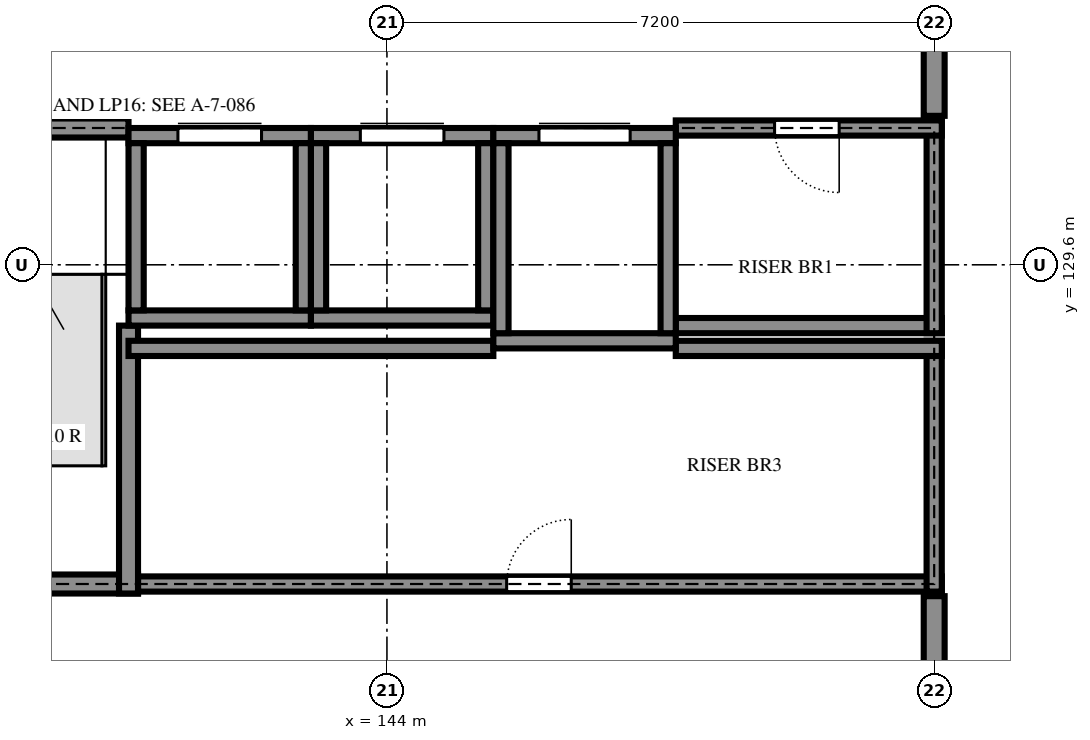
"""IFC4 building model, lengths in metres.
Left out: names, types, materials, properties, quantities, classifications, styles, units other than length and angle.
Written with IfcOpenShell. Run it as: python <this file> out.ifc"""

import sys

from ifc_helpers import new_model, si_unit, direction, frame, frame_2d, origin, place, context, subcontext, project, spatial, rectangle, extrude, element, fill, save


model = new_model("IFC4")
c1 = context("Model", 3, precision=1e-05, world=origin(), true_north=direction((0.0, 1.0)))
c2 = subcontext(c1, "Body", "Model", "MODEL_VIEW")
j1 = project(units=[si_unit("LENGTHUNIT", "METRE"), si_unit("PLANEANGLEUNIT", "RADIAN")], contexts=[c1])
p1 = place(None, origin())
s1 = spatial("IfcSite", under=j1, at=p1, CompositionType="ELEMENT")
p2 = place(p1, origin())
s2 = spatial("IfcBuilding", under=s1, at=p2, CompositionType="ELEMENT")
p3 = place(p2, frame((0.0, 0.0, 10.8)))
s3 = spatial("IfcBuildingStorey", under=s2, at=p3, CompositionType="ELEMENT", Elevation=10.8)
p4 = place(p3, frame((136.675, 125.4, 0.0), z_axis=(0.0, 0.0, 1.0), x_axis=(1.0, 0.0, 0.0)))
e1 = element("IfcWall", 1, at=p4, inside=s3, PredefinedType="SHEAR", context=c2, shape_type="SweptSolid", body=[
    extrude(rectangle(XDim=4.05, YDim=0.25, at=frame_2d((2.025, 0.0))), origin(), (0.0, 0.0, 1.0), 3.6),
])
p5 = place(p4, frame((1.375, 0.0, 0.0)))
e2 = element("IfcOpeningElement", 2, at=p5, cuts=e1, PredefinedType="OPENING", context=c2, shape_type="SweptSolid", body=[
    extrude(rectangle(XDim=1.2, YDim=2.4, at=frame_2d((0.6, 1.2))), frame((0.0, 0.135, 0.0), z_axis=(0.0, -1.0, 0.0), x_axis=(1.0, 0.0, 0.0)), (0.0, 0.0, 1.0), 0.27),
])
p6 = place(p3, frame((140.725, 125.4, 0.0), z_axis=(0.0, 0.0, 1.0), x_axis=(1.0, 0.0, 0.0)))
e3 = element("IfcWall", 3, at=p6, inside=s3, PredefinedType="SHEAR", context=c2, shape_type="SweptSolid", body=[
    extrude(rectangle(XDim=10.575, YDim=0.2, at=frame_2d((5.288, 0.0))), origin(), (0.0, 0.0, 1.0), 3.6),
])
p7 = place(p6, frame((4.85, 0.0, 0.0)))
e4 = element("IfcOpeningElement", 4, at=p7, cuts=e3, PredefinedType="OPENING", context=c2, shape_type="SweptSolid", body=[
    extrude(rectangle(XDim=0.85, YDim=2.1, at=frame_2d((0.425, 1.05))), frame((0.0, 0.11, 0.0), z_axis=(0.0, -1.0, 0.0), x_axis=(1.0, 0.0, 0.0)), (0.0, 0.0, 1.0), 0.22),
])
p8 = place(p3, frame((140.6, 125.275, 0.0), z_axis=(0.0, 0.0, 1.0), x_axis=(0.0, 1.0, 0.0)))
e5 = element("IfcWall", 5, at=p8, inside=s3, PredefinedType="SHEAR", context=c2, shape_type="SweptSolid", body=[
    extrude(rectangle(XDim=3.525, YDim=0.25, at=frame_2d((1.763, 0.0))), origin(), (0.0, 0.0, 1.0), 3.6),
])
p9 = place(p3, frame((151.2, 125.3, 0.0), z_axis=(0.0, 0.0, 1.0), x_axis=(0.0, 1.0, 0.0)))
e6 = element("IfcWall", 6, at=p9, inside=s3, PredefinedType="SHEAR", context=c2, shape_type="SweptSolid", body=[
    extrude(rectangle(XDim=3.3, YDim=0.2, at=frame_2d((1.65, 0.0))), origin(), (0.0, 0.0, 1.0), 3.6),
])
p10 = place(p3, frame((140.6, 128.5, 0.0), z_axis=(0.0, 0.0, 1.0), x_axis=(1.0, 0.0, 0.0)))
e7 = element("IfcWall", 7, at=p10, inside=s3, PredefinedType="SHEAR", context=c2, shape_type="SweptSolid", body=[
    extrude(rectangle(XDim=4.8, YDim=0.2, at=frame_2d((2.4, 0.0))), origin(), (0.0, 0.0, 1.0), 3.6),
])
for number, where, z_axis, x_axis in (
    (8, (147.8, 128.5, 0.0), (0.0, 0.0, 1.0), (1.0, 0.0, 0.0)),
    (9, (147.8, 128.8, 0.0), (0.0, 0.0, 1.0), (1.0, 0.0, 0.0)),
):
    element("IfcWall", number, at=place(p3, frame(where, z_axis=z_axis, x_axis=x_axis)), inside=s3, PredefinedType="SHEAR", context=c2, shape_type="SweptSolid", body=[
        extrude(rectangle(XDim=3.5, YDim=0.2, at=frame_2d((1.75, 0.0))), origin(), (0.0, 0.0, 1.0), 3.6),
    ])
p11 = place(p3, frame((151.2, 128.7, 0.0), z_axis=(0.0, 0.0, 1.0), x_axis=(0.0, 1.0, 0.0)))
e10 = element("IfcWall", 10, at=p11, inside=s3, PredefinedType="SHEAR", context=c2, shape_type="SweptSolid", body=[
    extrude(rectangle(XDim=2.8, YDim=0.2, at=frame_2d((1.4, 0.0))), origin(), (0.0, 0.0, 1.0), 3.6),
])
p12 = place(p3, frame((140.6, 131.4, 0.0), z_axis=(0.0, 0.0, 1.0), x_axis=(-1.0, 0.0, 0.0)))
e11 = element("IfcWall", 11, at=p12, inside=s3, PredefinedType="SHEAR", context=c2, shape_type="SweptSolid", body=[
    extrude(rectangle(XDim=3.925, YDim=0.25, at=frame_2d((1.962, 0.0))), origin(), (0.0, 0.0, 1.0), 3.6),
])
p13 = place(p3, frame((151.3, 131.4, 0.0), z_axis=(0.0, 0.0, 1.0), x_axis=(-1.0, 0.0, 0.0)))
e12 = element("IfcWall", 12, at=p13, inside=s3, PredefinedType="SHEAR", context=c2, shape_type="SweptSolid", body=[
    extrude(rectangle(XDim=3.5, YDim=0.2, at=frame_2d((1.75, 0.0))), origin(), (0.0, 0.0, 1.0), 3.6),
])
p14 = place(p13, frame((1.35, 0.0, 0.0)))
e13 = element("IfcOpeningElement", 13, at=p14, cuts=e12, PredefinedType="OPENING", context=c2, shape_type="SweptSolid", body=[
    extrude(rectangle(XDim=0.85, YDim=2.1, at=frame_2d((0.425, 1.05))), frame((0.0, 0.11, 0.0), z_axis=(0.0, -1.0, 0.0), x_axis=(1.0, 0.0, 0.0)), (0.0, 0.0, 1.0), 0.22),
])
p15 = place(p3, frame((140.6, 128.9, 0.0), z_axis=(0.0, 0.0, 1.0), x_axis=(1.0, 0.0, 0.0)))
e14 = element("IfcWall", 14, at=p15, inside=s3, PredefinedType="SHEAR", context=c2, shape_type="SweptSolid", body=[
    extrude(rectangle(XDim=2.4, YDim=0.2, at=frame_2d((1.2, 0.0))), origin(), (0.0, 0.0, 1.0), 3.6),
])
p16 = place(p3, frame((140.6, 131.3, 0.0), z_axis=(0.0, 0.0, 1.0), x_axis=(1.0, 0.0, 0.0)))
e15 = element("IfcWall", 15, at=p16, inside=s3, PredefinedType="SHEAR", context=c2, shape_type="SweptSolid", body=[
    extrude(rectangle(XDim=2.4, YDim=0.2, at=frame_2d((1.2, 0.0))), origin(), (0.0, 0.0, 1.0), 3.6),
])
p17 = place(p16, frame((0.65, 0.0, 0.0)))
e16 = element("IfcOpeningElement", 16, at=p17, cuts=e15, PredefinedType="OPENING", context=c2, shape_type="SweptSolid", body=[
    extrude(rectangle(XDim=1.1, YDim=2.1, at=frame_2d((0.55, 1.05))), frame((0.0, 0.11, 0.0), z_axis=(0.0, -1.0, 0.0), x_axis=(1.0, 0.0, 0.0)), (0.0, 0.0, 1.0), 0.22),
])
for number, where, z_axis, x_axis in (
    (17, (140.7, 129.0, 0.0), (0.0, 0.0, 1.0), (0.0, 1.0, 0.0)),
    (18, (142.9, 129.0, 0.0), (0.0, 0.0, 1.0), (0.0, 1.0, 0.0)),
):
    element("IfcWall", number, at=place(p3, frame(where, z_axis=z_axis, x_axis=x_axis)), inside=s3, PredefinedType="SHEAR", context=c2, shape_type="SweptSolid", body=[
        extrude(rectangle(XDim=2.2, YDim=0.2, at=frame_2d((1.1, 0.0))), origin(), (0.0, 0.0, 1.0), 3.6),
    ])
p18 = place(p3, frame((143.0, 128.9, 0.0), z_axis=(0.0, 0.0, 1.0), x_axis=(1.0, 0.0, 0.0)))
e19 = element("IfcWall", 19, at=p18, inside=s3, PredefinedType="SHEAR", context=c2, shape_type="SweptSolid", body=[
    extrude(rectangle(XDim=2.4, YDim=0.2, at=frame_2d((1.2, 0.0))), origin(), (0.0, 0.0, 1.0), 3.6),
])
p19 = place(p3, frame((143.0, 131.3, 0.0), z_axis=(0.0, 0.0, 1.0), x_axis=(1.0, 0.0, 0.0)))
e20 = element("IfcWall", 20, at=p19, inside=s3, PredefinedType="SHEAR", context=c2, shape_type="SweptSolid", body=[
    extrude(rectangle(XDim=2.4, YDim=0.2, at=frame_2d((1.2, 0.0))), origin(), (0.0, 0.0, 1.0), 3.6),
])
p20 = place(p19, frame((0.65, 0.0, 0.0)))
e21 = element("IfcOpeningElement", 21, at=p20, cuts=e20, PredefinedType="OPENING", context=c2, shape_type="SweptSolid", body=[
    extrude(rectangle(XDim=1.1, YDim=2.1, at=frame_2d((0.55, 1.05))), frame((0.0, 0.11, 0.0), z_axis=(0.0, -1.0, 0.0), x_axis=(1.0, 0.0, 0.0)), (0.0, 0.0, 1.0), 0.22),
])
for number, where, z_axis, x_axis in (
    (22, (143.1, 129.0, 0.0), (0.0, 0.0, 1.0), (0.0, 1.0, 0.0)),
    (23, (145.3, 129.0, 0.0), (0.0, 0.0, 1.0), (0.0, 1.0, 0.0)),
):
    element("IfcWall", number, at=place(p3, frame(where, z_axis=z_axis, x_axis=x_axis)), inside=s3, PredefinedType="SHEAR", context=c2, shape_type="SweptSolid", body=[
        extrude(rectangle(XDim=2.2, YDim=0.2, at=frame_2d((1.1, 0.0))), origin(), (0.0, 0.0, 1.0), 3.6),
    ])
p21 = place(p3, frame((145.4, 128.6, 0.0), z_axis=(0.0, 0.0, 1.0), x_axis=(1.0, 0.0, 0.0)))
e24 = element("IfcWall", 24, at=p21, inside=s3, PredefinedType="SHEAR", context=c2, shape_type="SweptSolid", body=[
    extrude(rectangle(XDim=2.4, YDim=0.2, at=frame_2d((1.2, 0.0))), origin(), (0.0, 0.0, 1.0), 3.6),
])
p22 = place(p3, frame((145.4, 131.3, 0.0), z_axis=(0.0, 0.0, 1.0), x_axis=(1.0, 0.0, 0.0)))
e25 = element("IfcWall", 25, at=p22, inside=s3, PredefinedType="SHEAR", context=c2, shape_type="SweptSolid", body=[
    extrude(rectangle(XDim=2.4, YDim=0.2, at=frame_2d((1.2, 0.0))), origin(), (0.0, 0.0, 1.0), 3.6),
])
p23 = place(p22, frame((0.6, 0.0, 0.0)))
e26 = element("IfcOpeningElement", 26, at=p23, cuts=e25, PredefinedType="OPENING", context=c2, shape_type="SweptSolid", body=[
    extrude(rectangle(XDim=1.2, YDim=2.1, at=frame_2d((0.6, 1.05))), frame((0.0, 0.11, 0.0), z_axis=(0.0, -1.0, 0.0), x_axis=(1.0, 0.0, 0.0)), (0.0, 0.0, 1.0), 0.22),
])
for number, where, z_axis, x_axis in (
    (27, (145.5, 128.7, 0.0), (0.0, 0.0, 1.0), (0.0, 1.0, 0.0)),
    (28, (147.7, 128.7, 0.0), (0.0, 0.0, 1.0), (0.0, 1.0, 0.0)),
):
    element("IfcWall", number, at=place(p3, frame(where, z_axis=z_axis, x_axis=x_axis)), inside=s3, PredefinedType="SHEAR", context=c2, shape_type="SweptSolid", body=[
        extrude(rectangle(XDim=2.5, YDim=0.2, at=frame_2d((1.25, 0.0))), origin(), (0.0, 0.0, 1.0), 3.6),
    ])
p24 = place(p3, frame((151.2, 122.64, 0.0), z_axis=(0.0, 0.0, 1.0), x_axis=(0.0, 1.0, 0.0)))
e29 = element("IfcWall", 29, at=p24, inside=s3, PredefinedType="PARTITIONING", context=c2, shape_type="SweptSolid", body=[
    extrude(rectangle(XDim=2.6, YDim=0.275, at=frame_2d((1.3, 0.0))), origin(), (0.0, 0.0, 1.0), 3.6),
])
p25 = place(p3, frame((151.2, 134.333, 0.0), z_axis=(0.0, 0.0, 1.0), x_axis=(0.0, -1.0, 0.0)))
e30 = element("IfcWall", 30, at=p25, inside=s3, PredefinedType="PARTITIONING", context=c2, shape_type="SweptSolid", body=[
    extrude(rectangle(XDim=2.772, YDim=0.275, at=frame_2d((1.386, 0.0))), origin(), (0.0, 0.0, 1.0), 3.6),
])
p26 = place(p17, origin())
e31 = element("IfcDoor", 31, at=p26, inside=s3, OperationType="SLIDING_TO_LEFT", PredefinedType="DOOR", context=c2, shape_type="SweptSolid", body=[
    extrude(rectangle(XDim=1.1, YDim=2.1, at=frame_2d((0.55, 1.05))), frame((0.0, 0.025, 0.0), z_axis=(0.0, -1.0, 0.0), x_axis=(1.0, 0.0, 0.0)), (0.0, 0.0, 1.0), 0.05),
])
fill(e16, e31)
p27 = place(p20, origin())
e32 = element("IfcDoor", 32, at=p27, inside=s3, OperationType="SLIDING_TO_LEFT", PredefinedType="DOOR", context=c2, shape_type="SweptSolid", body=[
    extrude(rectangle(XDim=1.1, YDim=2.1, at=frame_2d((0.55, 1.05))), frame((0.0, 0.025, 0.0), z_axis=(0.0, -1.0, 0.0), x_axis=(1.0, 0.0, 0.0)), (0.0, 0.0, 1.0), 0.05),
])
fill(e21, e32)
p28 = place(p23, origin())
e33 = element("IfcDoor", 33, at=p28, inside=s3, OperationType="SLIDING_TO_LEFT", PredefinedType="DOOR", context=c2, shape_type="SweptSolid", body=[
    extrude(rectangle(XDim=1.2, YDim=2.1, at=frame_2d((0.6, 1.05))), frame((0.0, 0.025, 0.0), z_axis=(0.0, -1.0, 0.0), x_axis=(1.0, 0.0, 0.0)), (0.0, 0.0, 1.0), 0.05),
])
fill(e26, e33)
p29 = place(p14, origin())
e34 = element("IfcDoor", 34, at=p29, inside=s3, OperationType="SINGLE_SWING_RIGHT", PredefinedType="DOOR", context=c2, shape_type="SweptSolid", body=[
    extrude(rectangle(XDim=0.85, YDim=2.1, at=frame_2d((0.425, 1.05))), frame((0.0, 0.025, 0.0), z_axis=(0.0, -1.0, 0.0), x_axis=(1.0, 0.0, 0.0)), (0.0, 0.0, 1.0), 0.05),
])
fill(e13, e34)
p30 = place(p7, origin())
e35 = element("IfcDoor", 35, at=p30, inside=s3, OperationType="SINGLE_SWING_LEFT", PredefinedType="DOOR", context=c2, shape_type="SweptSolid", body=[
    extrude(rectangle(XDim=0.85, YDim=2.1, at=frame_2d((0.425, 1.05))), frame((0.0, 0.025, 0.0), z_axis=(0.0, -1.0, 0.0), x_axis=(1.0, 0.0, 0.0)), (0.0, 0.0, 1.0), 0.05),
])
fill(e4, e35)
save(model, sys.argv[1])
